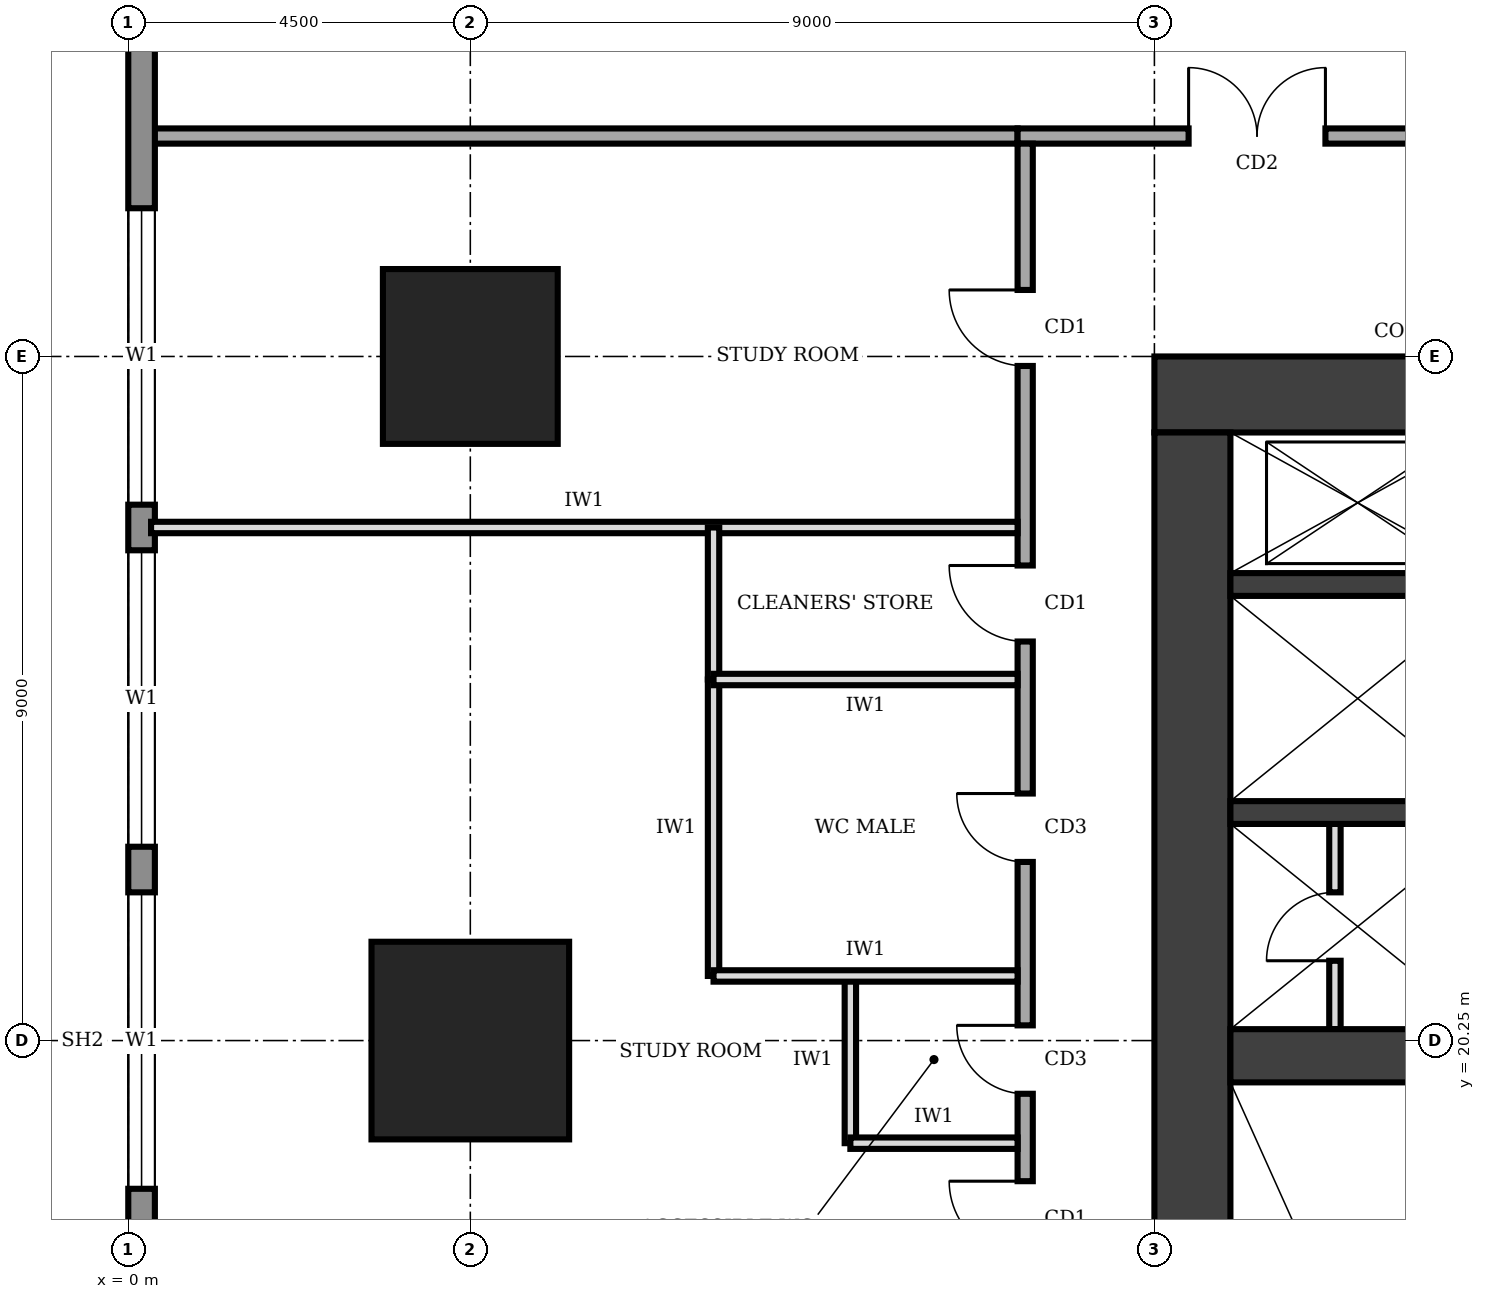
"""IFC4 building model, lengths in metres.
Left out: names, types, materials, properties, quantities, classifications, styles, units other than length and angle.
Written with IfcOpenShell. Run it as: python <this file> out.ifc"""

import sys

from ifc_helpers import new_model, si_unit, direction, frame, frame_2d, origin, origin_2d, place, context, subcontext, project, spatial, rectangle, extrude, element, fill, save


model = new_model("IFC4")
c1 = context("Model", 3, precision=1e-05, world=origin(), true_north=direction((0.0, 1.0)))
c2 = subcontext(c1, "Body", "Model", "MODEL_VIEW")
j1 = project(units=[si_unit("LENGTHUNIT", "METRE"), si_unit("PLANEANGLEUNIT", "RADIAN")], contexts=[c1])
p1 = place(None, origin())
s1 = spatial("IfcSite", under=j1, at=p1, CompositionType="ELEMENT")
p2 = place(p1, origin())
s2 = spatial("IfcBuilding", under=s1, at=p2, CompositionType="ELEMENT")
p3 = place(p2, frame((0.0, 0.0, 117.0)))
s3 = spatial("IfcBuildingStorey", under=s2, at=p3, CompositionType="ELEMENT", Elevation=117.0)
p4 = place(p3, frame((27.0, 28.75, 0.0), z_axis=(0.0, 0.0, 1.0), x_axis=(-1.0, 0.0, 0.0)))
e1 = element("IfcWall", 1, at=p4, inside=s3, PredefinedType="SHEAR", context=c2, shape_type="SweptSolid", body=[
    extrude(rectangle(XDim=13.5, YDim=1.0, at=frame_2d((6.75, 0.0))), origin(), (0.0, 0.0, 1.0), 4.0),
])
p5 = place(p4, frame((4.75, 0.0, 0.0)))
e2 = element("IfcOpeningElement", 2, at=p5, cuts=e1, PredefinedType="OPENING", context=c2, shape_type="SweptSolid", body=[
    extrude(rectangle(XDim=1.8, YDim=2.1, at=frame_2d((0.9, 1.05))), frame((0.0, 0.51, 0.0), z_axis=(0.0, -1.0, 0.0), x_axis=(1.0, 0.0, 0.0)), (0.0, 0.0, 1.0), 1.02),
])
p6 = place(p3, frame((14.0, 28.25, 0.0), z_axis=(0.0, 0.0, 1.0), x_axis=(0.0, -1.0, 0.0)))
e3 = element("IfcWall", 3, at=p6, inside=s3, PredefinedType="SHEAR", context=c2, shape_type="SweptSolid", body=[
    extrude(rectangle(XDim=16.0, YDim=1.0, at=frame_2d((8.0, 0.0))), origin(), (0.0, 0.0, 1.0), 4.0),
])
p7 = place(p3, frame((14.5, 20.05, 0.0), z_axis=(0.0, 0.0, 1.0), x_axis=(1.0, 0.0, 0.0)))
e4 = element("IfcWall", 4, at=p7, inside=s3, PredefinedType="SHEAR", context=c2, shape_type="SweptSolid", body=[
    extrude(rectangle(XDim=3.35, YDim=0.7, at=frame_2d((1.675, 0.0))), origin(), (0.0, 0.0, 1.0), 4.0),
])
for number, where, z_axis, x_axis in (
    (5, (14.5, 23.25, 0.0), (0.0, 0.0, 1.0), (1.0, 0.0, 0.0)),
    (6, (14.5, 26.25, 0.0), (0.0, 0.0, 1.0), (1.0, 0.0, 0.0)),
):
    element("IfcWall", number, at=place(p3, frame(where, z_axis=z_axis, x_axis=x_axis)), inside=s3, PredefinedType="SHEAR", context=c2, shape_type="SweptSolid", body=[
        extrude(rectangle(XDim=3.35, YDim=0.3, at=frame_2d((1.675, 0.0))), origin(), (0.0, 0.0, 1.0), 4.0),
    ])
p8 = place(p3, frame((4.5, 20.25, 0.0), z_axis=(0.0, 0.0, 1.0), x_axis=(1.0, 0.0, 0.0)))
e7 = element("IfcColumn", 7, at=p8, inside=s3, PredefinedType="COLUMN", context=c2, shape_type="SweptSolid", body=[
    extrude(rectangle(XDim=2.6, YDim=2.6, at=origin_2d()), origin(), (0.0, 0.0, 1.0), 4.0),
])
p9 = place(p3, frame((4.5, 29.25, 0.0), z_axis=(0.0, 0.0, 1.0), x_axis=(1.0, 0.0, 0.0)))
e8 = element("IfcColumn", 8, at=p9, inside=s3, PredefinedType="COLUMN", context=c2, shape_type="SweptSolid", body=[
    extrude(rectangle(XDim=2.3, YDim=2.3, at=origin_2d()), origin(), (0.0, 0.0, 1.0), 4.0),
])
p10 = place(p3, frame((0.175, 35.98, 0.0), z_axis=(0.0, 0.0, 1.0), x_axis=(0.0, -1.0, 0.0)))
e9 = element("IfcWall", 9, at=p10, inside=s3, PredefinedType="STANDARD", context=c2, shape_type="SweptSolid", body=[
    extrude(rectangle(XDim=31.46, YDim=0.35, at=frame_2d((15.73, 0.0))), origin(), (0.0, 0.0, 1.0), 3.75),
])
p11 = place(p10, frame((27.21, 0.0, 0.9)))
e10 = element("IfcOpeningElement", 10, at=p11, cuts=e9, PredefinedType="OPENING", context=c2, shape_type="SweptSolid", body=[
    extrude(rectangle(XDim=3.9, YDim=2.2, at=frame_2d((1.95, 1.1))), frame((0.0, 0.185, 0.0), z_axis=(0.0, -1.0, 0.0), x_axis=(1.0, 0.0, 0.0)), (0.0, 0.0, 1.0), 0.37),
])
p12 = place(p10, frame((22.78, 0.0, 0.9)))
e11 = element("IfcOpeningElement", 11, at=p12, cuts=e9, PredefinedType="OPENING", context=c2, shape_type="SweptSolid", body=[
    extrude(rectangle(XDim=3.9, YDim=2.2, at=frame_2d((1.95, 1.1))), frame((0.0, 0.185, 0.0), z_axis=(0.0, -1.0, 0.0), x_axis=(1.0, 0.0, 0.0)), (0.0, 0.0, 1.0), 0.37),
])
p13 = place(p10, frame((18.28, 0.0, 0.9)))
e12 = element("IfcOpeningElement", 12, at=p13, cuts=e9, PredefinedType="OPENING", context=c2, shape_type="SweptSolid", body=[
    extrude(rectangle(XDim=3.9, YDim=2.2, at=frame_2d((1.95, 1.1))), frame((0.0, 0.185, 0.0), z_axis=(0.0, -1.0, 0.0), x_axis=(1.0, 0.0, 0.0)), (0.0, 0.0, 1.0), 0.37),
])
p14 = place(p10, frame((13.78, 0.0, 0.9)))
e13 = element("IfcOpeningElement", 13, at=p14, cuts=e9, PredefinedType="OPENING", context=c2, shape_type="SweptSolid", body=[
    extrude(rectangle(XDim=3.9, YDim=2.2, at=frame_2d((1.95, 1.1))), frame((0.0, 0.185, 0.0), z_axis=(0.0, -1.0, 0.0), x_axis=(1.0, 0.0, 0.0)), (0.0, 0.0, 1.0), 0.37),
])
p15 = place(p10, frame((9.28, 0.0, 0.9)))
e14 = element("IfcOpeningElement", 14, at=p15, cuts=e9, PredefinedType="OPENING", context=c2, shape_type="SweptSolid", body=[
    extrude(rectangle(XDim=3.9, YDim=2.2, at=frame_2d((1.95, 1.1))), frame((0.0, 0.185, 0.0), z_axis=(0.0, -1.0, 0.0), x_axis=(1.0, 0.0, 0.0)), (0.0, 0.0, 1.0), 0.37),
])
p16 = place(p10, frame((4.78, 0.0, 0.9)))
e15 = element("IfcOpeningElement", 15, at=p16, cuts=e9, PredefinedType="OPENING", context=c2, shape_type="SweptSolid", body=[
    extrude(rectangle(XDim=3.9, YDim=2.2, at=frame_2d((1.95, 1.1))), frame((0.0, 0.185, 0.0), z_axis=(0.0, -1.0, 0.0), x_axis=(1.0, 0.0, 0.0)), (0.0, 0.0, 1.0), 0.37),
])
p17 = place(p3, frame((15.875, 20.4, 0.0), z_axis=(0.0, 0.0, 1.0), x_axis=(0.0, 1.0, 0.0)))
e16 = element("IfcWall", 16, at=p17, inside=s3, PredefinedType="PARTITIONING", context=c2, shape_type="SweptSolid", body=[
    extrude(rectangle(XDim=2.7, YDim=0.15, at=frame_2d((1.35, 0.0))), origin(), (0.0, 0.0, 1.0), 3.75),
])
p18 = place(p17, frame((0.9, 0.0, 0.0)))
e17 = element("IfcOpeningElement", 17, at=p18, cuts=e16, PredefinedType="OPENING", context=c2, shape_type="SweptSolid", body=[
    extrude(rectangle(XDim=0.9, YDim=2.1, at=frame_2d((0.45, 1.05))), frame((0.0, 0.085, 0.0), z_axis=(0.0, -1.0, 0.0), x_axis=(1.0, 0.0, 0.0)), (0.0, 0.0, 1.0), 0.17),
])
p19 = place(p3, frame((29.35, 32.15, 0.0), z_axis=(0.0, 0.0, 1.0), x_axis=(-1.0, 0.0, 0.0)))
e18 = element("IfcWall", 18, at=p19, inside=s3, PredefinedType="SOLIDWALL", context=c2, shape_type="SweptSolid", body=[
    extrude(rectangle(XDim=17.65, YDim=0.2, at=frame_2d((8.825, 0.0))), origin(), (0.0, 0.0, 1.0), 3.75),
])
p20 = place(p19, frame((13.6, 0.0, 0.0)))
e19 = element("IfcOpeningElement", 19, at=p20, cuts=e18, PredefinedType="OPENING", context=c2, shape_type="SweptSolid", body=[
    extrude(rectangle(XDim=1.8, YDim=2.1, at=frame_2d((0.9, 1.05))), frame((0.0, 0.11, 0.0), z_axis=(0.0, -1.0, 0.0), x_axis=(1.0, 0.0, 0.0)), (0.0, 0.0, 1.0), 0.22),
])
p21 = place(p19, frame((6.35, 0.0, 0.0)))
e20 = element("IfcOpeningElement", 20, at=p21, cuts=e18, PredefinedType="OPENING", context=c2, shape_type="SweptSolid", body=[
    extrude(rectangle(XDim=1.0, YDim=2.1, at=frame_2d((0.5, 1.05))), frame((0.0, 0.11, 0.0), z_axis=(0.0, -1.0, 0.0), x_axis=(1.0, 0.0, 0.0)), (0.0, 0.0, 1.0), 0.22),
])
p22 = place(p19, frame((0.575, 0.0, 0.0)))
e21 = element("IfcOpeningElement", 21, at=p22, cuts=e18, PredefinedType="OPENING", context=c2, shape_type="SweptSolid", body=[
    extrude(rectangle(XDim=1.0, YDim=2.1, at=frame_2d((0.5, 1.05))), frame((0.0, 0.11, 0.0), z_axis=(0.0, -1.0, 0.0), x_axis=(1.0, 0.0, 0.0)), (0.0, 0.0, 1.0), 0.22),
])
p23 = place(p3, frame((11.8, 32.05, 0.0), z_axis=(0.0, 0.0, 1.0), x_axis=(0.0, -1.0, 0.0)))
e22 = element("IfcWall", 22, at=p23, inside=s3, PredefinedType="SOLIDWALL", context=c2, shape_type="SweptSolid", body=[
    extrude(rectangle(XDim=23.05, YDim=0.2, at=frame_2d((11.525, 0.0))), origin(), (0.0, 0.0, 1.0), 3.75),
])
p24 = place(p23, frame((20.3, 0.0, 0.0)))
e23 = element("IfcOpeningElement", 23, at=p24, cuts=e22, PredefinedType="OPENING", context=c2, shape_type="SweptSolid", body=[
    extrude(rectangle(XDim=1.0, YDim=2.1, at=frame_2d((0.5, 1.05))), frame((0.0, 0.11, 0.0), z_axis=(0.0, -1.0, 0.0), x_axis=(1.0, 0.0, 0.0)), (0.0, 0.0, 1.0), 0.22),
])
p25 = place(p23, frame((16.4, 0.0, 0.0)))
e24 = element("IfcOpeningElement", 24, at=p25, cuts=e22, PredefinedType="OPENING", context=c2, shape_type="SweptSolid", body=[
    extrude(rectangle(XDim=0.9, YDim=2.1, at=frame_2d((0.45, 1.05))), frame((0.0, 0.11, 0.0), z_axis=(0.0, -1.0, 0.0), x_axis=(1.0, 0.0, 0.0)), (0.0, 0.0, 1.0), 0.22),
])
p26 = place(p23, frame((11.6, 0.0, 0.0)))
e25 = element("IfcOpeningElement", 25, at=p26, cuts=e22, PredefinedType="OPENING", context=c2, shape_type="SweptSolid", body=[
    extrude(rectangle(XDim=0.9, YDim=2.1, at=frame_2d((0.45, 1.05))), frame((0.0, 0.11, 0.0), z_axis=(0.0, -1.0, 0.0), x_axis=(1.0, 0.0, 0.0)), (0.0, 0.0, 1.0), 0.22),
])
p27 = place(p23, frame((8.55, 0.0, 0.0)))
e26 = element("IfcOpeningElement", 26, at=p27, cuts=e22, PredefinedType="OPENING", context=c2, shape_type="SweptSolid", body=[
    extrude(rectangle(XDim=0.9, YDim=2.1, at=frame_2d((0.45, 1.05))), frame((0.0, 0.11, 0.0), z_axis=(0.0, -1.0, 0.0), x_axis=(1.0, 0.0, 0.0)), (0.0, 0.0, 1.0), 0.22),
])
p28 = place(p23, frame((5.55, 0.0, 0.0)))
e27 = element("IfcOpeningElement", 27, at=p28, cuts=e22, PredefinedType="OPENING", context=c2, shape_type="SweptSolid", body=[
    extrude(rectangle(XDim=1.0, YDim=2.1, at=frame_2d((0.5, 1.05))), frame((0.0, 0.11, 0.0), z_axis=(0.0, -1.0, 0.0), x_axis=(1.0, 0.0, 0.0)), (0.0, 0.0, 1.0), 0.22),
])
p29 = place(p23, frame((13.65, 0.0, 0.0)))
e28 = element("IfcOpeningElement", 28, at=p29, cuts=e22, PredefinedType="OPENING", context=c2, shape_type="SweptSolid", body=[
    extrude(rectangle(XDim=1.0, YDim=2.1, at=frame_2d((0.5, 1.05))), frame((0.0, 0.11, 0.0), z_axis=(0.0, -1.0, 0.0), x_axis=(1.0, 0.0, 0.0)), (0.0, 0.0, 1.0), 0.22),
])
p30 = place(p23, frame((1.925, 0.0, 0.0)))
e29 = element("IfcOpeningElement", 29, at=p30, cuts=e22, PredefinedType="OPENING", context=c2, shape_type="SweptSolid", body=[
    extrude(rectangle(XDim=1.0, YDim=2.1, at=frame_2d((0.5, 1.05))), frame((0.0, 0.11, 0.0), z_axis=(0.0, -1.0, 0.0), x_axis=(1.0, 0.0, 0.0)), (0.0, 0.0, 1.0), 0.22),
])
p31 = place(p3, frame((0.3, 32.15, 0.0), z_axis=(0.0, 0.0, 1.0), x_axis=(1.0, 0.0, 0.0)))
e30 = element("IfcWall", 30, at=p31, inside=s3, PredefinedType="SOLIDWALL", context=c2, shape_type="SweptSolid", body=[
    extrude(rectangle(XDim=11.4, YDim=0.2, at=frame_2d((5.7, 0.0))), origin(), (0.0, 0.0, 1.0), 3.75),
])
p32 = place(p3, frame((0.3, 27.0, 0.0), z_axis=(0.0, 0.0, 1.0), x_axis=(1.0, 0.0, 0.0)))
e31 = element("IfcWall", 31, at=p32, inside=s3, PredefinedType="PARTITIONING", context=c2, shape_type="SweptSolid", body=[
    extrude(rectangle(XDim=11.4, YDim=0.15, at=frame_2d((5.7, 0.0))), origin(), (0.0, 0.0, 1.0), 3.75),
])
p33 = place(p3, frame((11.7, 18.9, 0.0), z_axis=(0.0, 0.0, 1.0), x_axis=(-1.0, 0.0, 0.0)))
e32 = element("IfcWall", 32, at=p33, inside=s3, PredefinedType="PARTITIONING", context=c2, shape_type="SweptSolid", body=[
    extrude(rectangle(XDim=2.2, YDim=0.15, at=frame_2d((1.1, 0.0))), origin(), (0.0, 0.0, 1.0), 3.75),
])
p34 = place(p3, frame((11.7, 21.1, 0.0), z_axis=(0.0, 0.0, 1.0), x_axis=(-1.0, 0.0, 0.0)))
e33 = element("IfcWall", 33, at=p34, inside=s3, PredefinedType="PARTITIONING", context=c2, shape_type="SweptSolid", body=[
    extrude(rectangle(XDim=4.0, YDim=0.15, at=frame_2d((2.0, 0.0))), origin(), (0.0, 0.0, 1.0), 2.85),
])
p35 = place(p3, frame((11.7, 25.0, 0.0), z_axis=(0.0, 0.0, 1.0), x_axis=(-1.0, 0.0, 0.0)))
e34 = element("IfcWall", 34, at=p35, inside=s3, PredefinedType="PARTITIONING", context=c2, shape_type="SweptSolid", body=[
    extrude(rectangle(XDim=4.0, YDim=0.15, at=frame_2d((2.0, 0.0))), origin(), (0.0, 0.0, 1.0), 3.75),
])
p36 = place(p3, frame((9.5, 18.9, 0.0), z_axis=(0.0, 0.0, 1.0), x_axis=(0.0, 1.0, 0.0)))
e35 = element("IfcWall", 35, at=p36, inside=s3, PredefinedType="PARTITIONING", context=c2, shape_type="SweptSolid", body=[
    extrude(rectangle(XDim=2.2, YDim=0.15, at=frame_2d((1.1, 0.0))), origin(), (0.0, 0.0, 1.0), 3.75),
])
p37 = place(p3, frame((7.7, 21.1, 0.0), z_axis=(0.0, 0.0, 1.0), x_axis=(0.0, 1.0, 0.0)))
e36 = element("IfcWall", 36, at=p37, inside=s3, PredefinedType="PARTITIONING", context=c2, shape_type="SweptSolid", body=[
    extrude(rectangle(XDim=3.9, YDim=0.15, at=frame_2d((1.95, 0.0))), origin(), (0.0, 0.0, 1.0), 3.75),
])
p38 = place(p3, frame((7.7, 25.0, 0.0), z_axis=(0.0, 0.0, 1.0), x_axis=(0.0, 1.0, 0.0)))
e37 = element("IfcWall", 37, at=p38, inside=s3, PredefinedType="PARTITIONING", context=c2, shape_type="SweptSolid", body=[
    extrude(rectangle(XDim=2.0, YDim=0.15, at=frame_2d((1.0, 0.0))), origin(), (0.0, 0.0, 1.0), 3.75),
])
p39 = place(p14, origin())
e38 = element("IfcWindow", 38, at=p39, inside=s3, PartitioningType="SINGLE_PANEL", PredefinedType="WINDOW", context=c2, shape_type="SweptSolid", body=[
    extrude(rectangle(XDim=3.9, YDim=2.2, at=frame_2d((1.95, 1.1))), frame((0.0, 0.03, 0.0), z_axis=(0.0, -1.0, 0.0), x_axis=(1.0, 0.0, 0.0)), (0.0, 0.0, 1.0), 0.06),
])
fill(e13, e38)
p40 = place(p15, origin())
e39 = element("IfcWindow", 39, at=p40, inside=s3, PartitioningType="SINGLE_PANEL", PredefinedType="WINDOW", context=c2, shape_type="SweptSolid", body=[
    extrude(rectangle(XDim=3.9, YDim=2.2, at=frame_2d((1.95, 1.1))), frame((0.0, 0.03, 0.0), z_axis=(0.0, -1.0, 0.0), x_axis=(1.0, 0.0, 0.0)), (0.0, 0.0, 1.0), 0.06),
])
fill(e14, e39)
p41 = place(p16, origin())
e40 = element("IfcWindow", 40, at=p41, inside=s3, PartitioningType="SINGLE_PANEL", PredefinedType="WINDOW", context=c2, shape_type="SweptSolid", body=[
    extrude(rectangle(XDim=3.9, YDim=2.2, at=frame_2d((1.95, 1.1))), frame((0.0, 0.03, 0.0), z_axis=(0.0, -1.0, 0.0), x_axis=(1.0, 0.0, 0.0)), (0.0, 0.0, 1.0), 0.06),
])
fill(e15, e40)
p42 = place(p18, origin())
e41 = element("IfcDoor", 41, at=p42, inside=s3, OperationType="SINGLE_SWING_LEFT", PredefinedType="DOOR", context=c2, shape_type="SweptSolid", body=[
    extrude(rectangle(XDim=0.9, YDim=2.1, at=frame_2d((0.45, 1.05))), frame((0.0, 0.025, 0.0), z_axis=(0.0, -1.0, 0.0), x_axis=(1.0, 0.0, 0.0)), (0.0, 0.0, 1.0), 0.05),
])
fill(e17, e41)
p43 = place(p20, frame((1.8, 0.0, 0.0), z_axis=(0.0, 0.0, 1.0), x_axis=(-1.0, 0.0, 0.0)))
e42 = element("IfcDoor", 42, at=p43, inside=s3, OperationType="DOUBLE_DOOR_SINGLE_SWING", PredefinedType="DOOR", context=c2, shape_type="SweptSolid", body=[
    extrude(rectangle(XDim=1.8, YDim=2.1, at=frame_2d((0.9, 1.05))), frame((0.0, 0.025, 0.0), z_axis=(0.0, -1.0, 0.0), x_axis=(1.0, 0.0, 0.0)), (0.0, 0.0, 1.0), 0.05),
])
fill(e19, e42)
p44 = place(p26, frame((0.9, 0.0, 0.0), z_axis=(0.0, 0.0, 1.0), x_axis=(-1.0, 0.0, 0.0)))
e43 = element("IfcDoor", 43, at=p44, inside=s3, OperationType="SINGLE_SWING_RIGHT", PredefinedType="DOOR", context=c2, shape_type="SweptSolid", body=[
    extrude(rectangle(XDim=0.9, YDim=2.1, at=frame_2d((0.45, 1.05))), frame((0.0, 0.025, 0.0), z_axis=(0.0, -1.0, 0.0), x_axis=(1.0, 0.0, 0.0)), (0.0, 0.0, 1.0), 0.05),
])
fill(e25, e43)
p45 = place(p27, frame((0.9, 0.0, 0.0), z_axis=(0.0, 0.0, 1.0), x_axis=(-1.0, 0.0, 0.0)))
e44 = element("IfcDoor", 44, at=p45, inside=s3, OperationType="SINGLE_SWING_RIGHT", PredefinedType="DOOR", context=c2, shape_type="SweptSolid", body=[
    extrude(rectangle(XDim=0.9, YDim=2.1, at=frame_2d((0.45, 1.05))), frame((0.0, 0.025, 0.0), z_axis=(0.0, -1.0, 0.0), x_axis=(1.0, 0.0, 0.0)), (0.0, 0.0, 1.0), 0.05),
])
fill(e26, e44)
p46 = place(p28, frame((1.0, 0.0, 0.0), z_axis=(0.0, 0.0, 1.0), x_axis=(-1.0, 0.0, 0.0)))
e45 = element("IfcDoor", 45, at=p46, inside=s3, OperationType="SINGLE_SWING_RIGHT", PredefinedType="DOOR", context=c2, shape_type="SweptSolid", body=[
    extrude(rectangle(XDim=1.0, YDim=2.1, at=frame_2d((0.5, 1.05))), frame((0.0, 0.025, 0.0), z_axis=(0.0, -1.0, 0.0), x_axis=(1.0, 0.0, 0.0)), (0.0, 0.0, 1.0), 0.05),
])
fill(e27, e45)
p47 = place(p29, frame((1.0, 0.0, 0.0), z_axis=(0.0, 0.0, 1.0), x_axis=(-1.0, 0.0, 0.0)))
e46 = element("IfcDoor", 46, at=p47, inside=s3, OperationType="SINGLE_SWING_RIGHT", PredefinedType="DOOR", context=c2, shape_type="SweptSolid", body=[
    extrude(rectangle(XDim=1.0, YDim=2.1, at=frame_2d((0.5, 1.05))), frame((0.0, 0.025, 0.0), z_axis=(0.0, -1.0, 0.0), x_axis=(1.0, 0.0, 0.0)), (0.0, 0.0, 1.0), 0.05),
])
fill(e28, e46)
p48 = place(p30, frame((1.0, 0.0, 0.0), z_axis=(0.0, 0.0, 1.0), x_axis=(-1.0, 0.0, 0.0)))
e47 = element("IfcDoor", 47, at=p48, inside=s3, OperationType="SINGLE_SWING_RIGHT", PredefinedType="DOOR", context=c2, shape_type="SweptSolid", body=[
    extrude(rectangle(XDim=1.0, YDim=2.1, at=frame_2d((0.5, 1.05))), frame((0.0, 0.025, 0.0), z_axis=(0.0, -1.0, 0.0), x_axis=(1.0, 0.0, 0.0)), (0.0, 0.0, 1.0), 0.05),
])
fill(e29, e47)
save(model, sys.argv[1])
